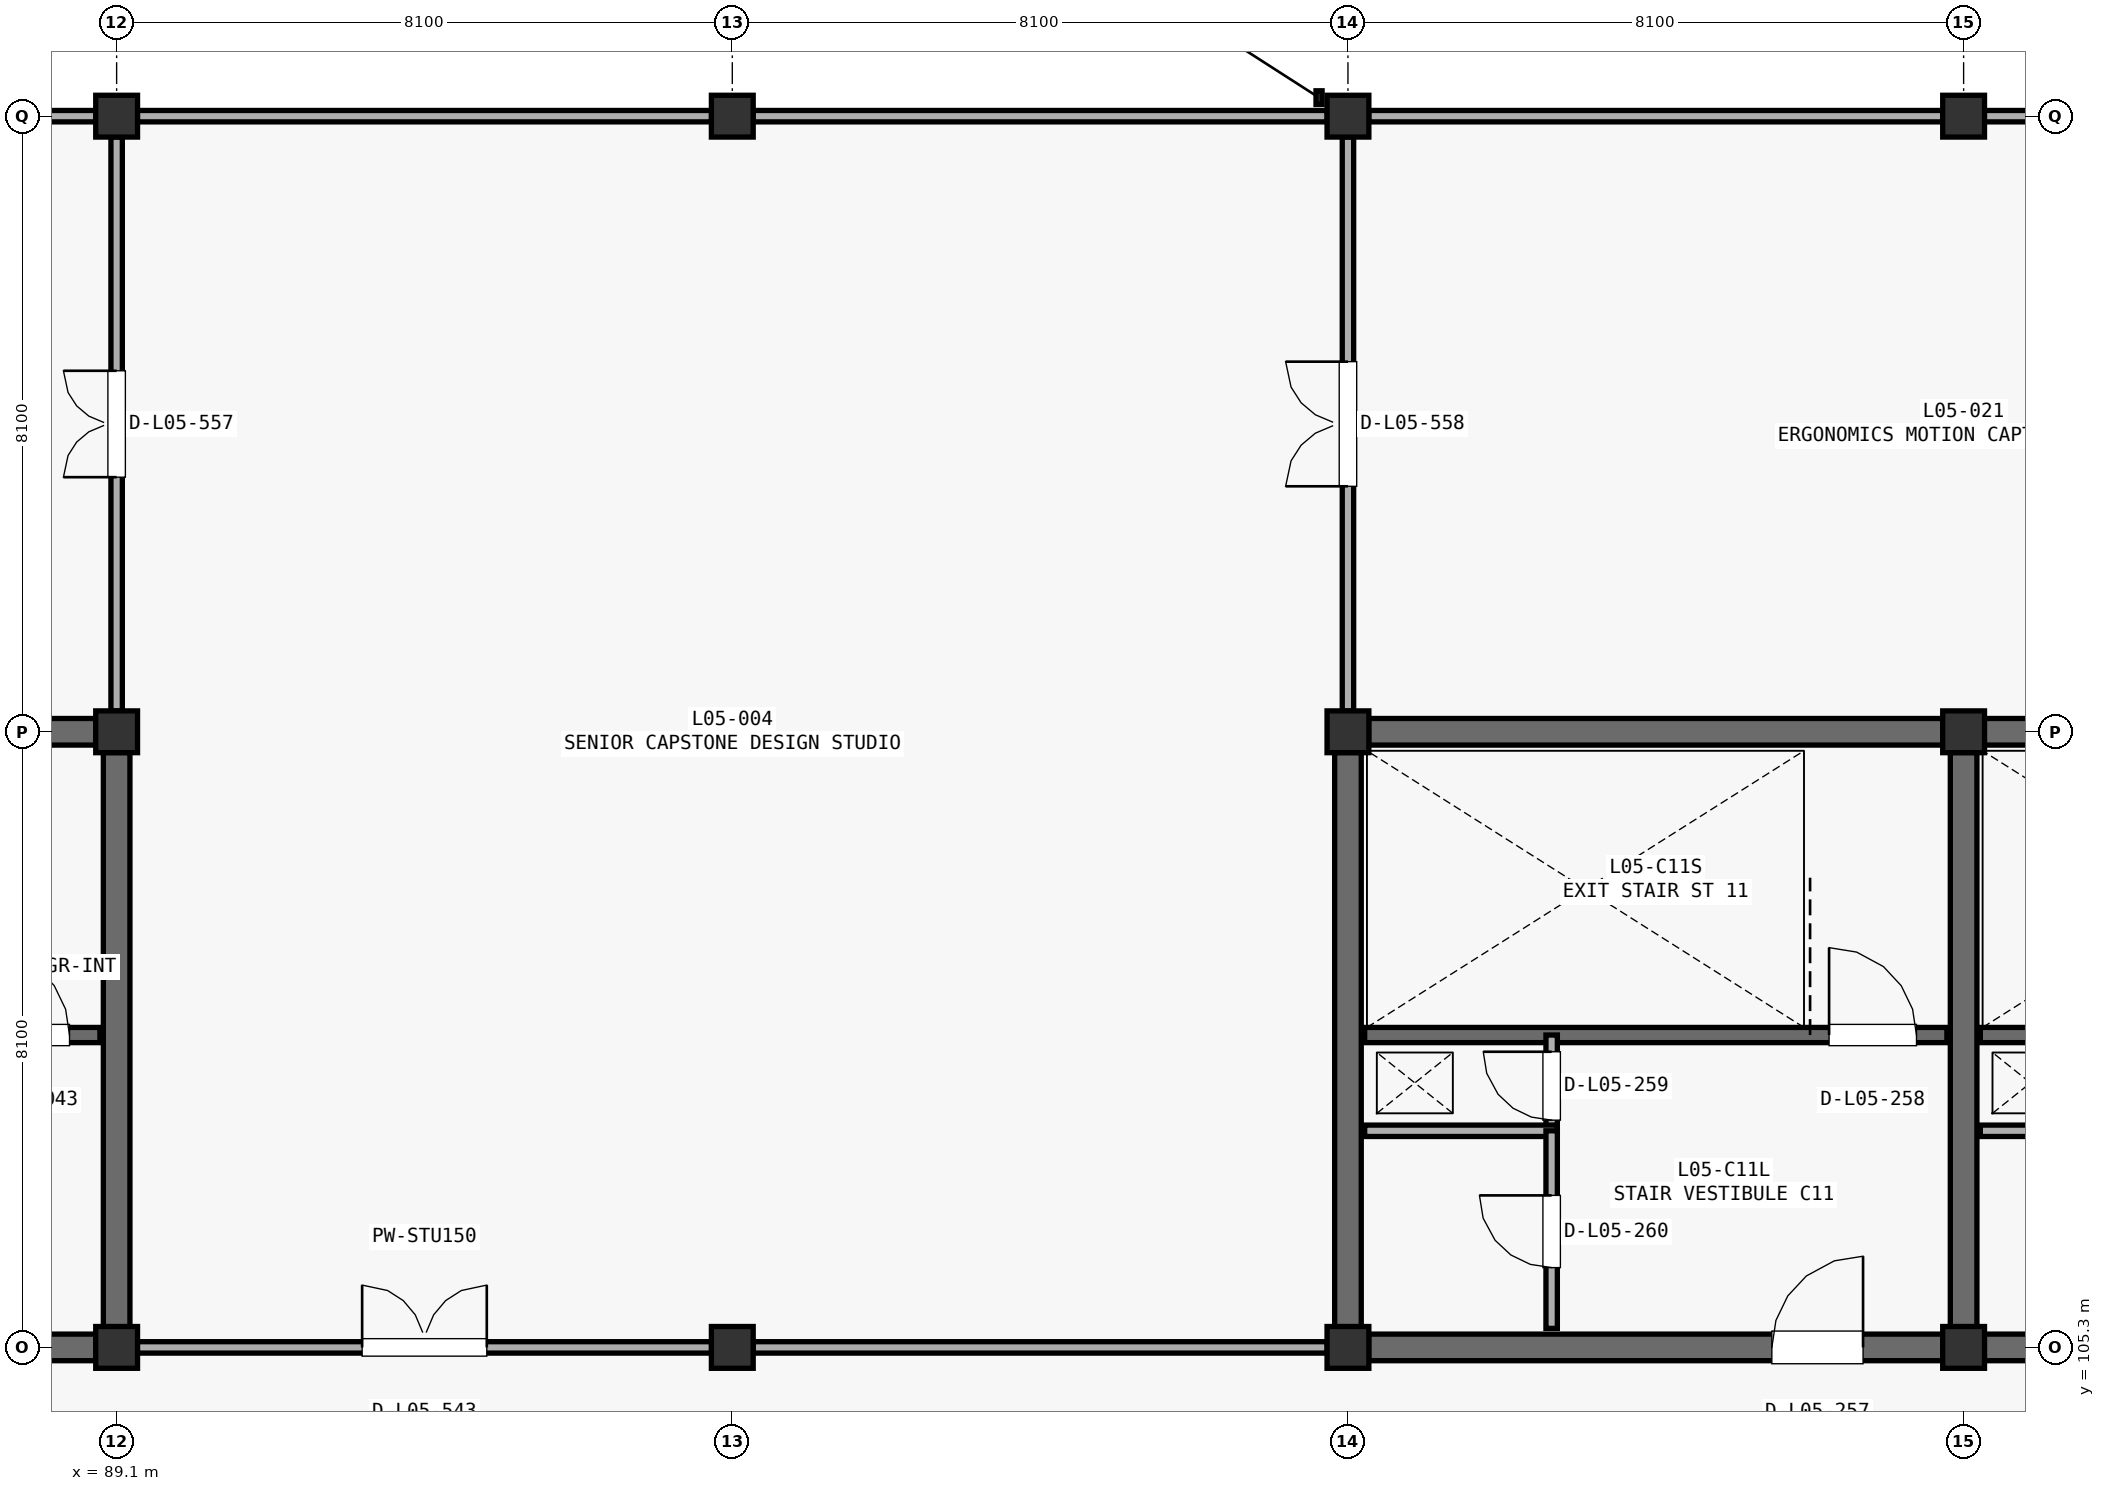
"""IFC4 building model, lengths in metres.
Left out: names, types, materials, properties, quantities, classifications, styles, units other than length and angle.
Written with IfcOpenShell. Run it as: python <this file> out.ifc"""

import sys

from ifc_helpers import new_model, si_unit, direction, frame, frame_2d, origin, origin_2d, place, context, subcontext, project, spatial, rectangle, extrude, element, fill, save


model = new_model("IFC4")
c1 = context("Model", 3, precision=1e-05, world=origin(), true_north=direction((0.0, 1.0)))
c2 = subcontext(c1, "Body", "Model", "MODEL_VIEW")
j1 = project(units=[si_unit("LENGTHUNIT", "METRE"), si_unit("PLANEANGLEUNIT", "RADIAN")], contexts=[c1])
p1 = place(None, origin())
s1 = spatial("IfcSite", under=j1, at=p1, CompositionType="ELEMENT")
p2 = place(p1, origin())
s2 = spatial("IfcBuilding", under=s1, at=p2, CompositionType="ELEMENT")
p3 = place(p2, frame((0.0, 0.0, 22.95)))
s3 = spatial("IfcBuildingStorey", under=s2, at=p3, CompositionType="ELEMENT", Elevation=22.95)
for number, where, z_axis, x_axis in (
    (1, (89.1, 105.3, 0.0), (0.0, 0.0, 1.0), (1.0, 0.0, 0.0)),
    (2, (89.1, 113.4, 0.0), (0.0, 0.0, 1.0), (1.0, 0.0, 0.0)),
    (3, (89.1, 121.5, 0.0), (0.0, 0.0, 1.0), (1.0, 0.0, 0.0)),
    (4, (97.2, 105.3, 0.0), (0.0, 0.0, 1.0), (1.0, 0.0, 0.0)),
    (5, (97.2, 113.4, 0.0), (0.0, 0.0, 1.0), (1.0, 0.0, 0.0)),
    (6, (97.2, 121.5, 0.0), (0.0, 0.0, 1.0), (1.0, 0.0, 0.0)),
    (7, (105.3, 105.3, 0.0), (0.0, 0.0, 1.0), (1.0, 0.0, 0.0)),
    (8, (105.3, 113.4, 0.0), (0.0, 0.0, 1.0), (1.0, 0.0, 0.0)),
    (9, (105.3, 121.5, 0.0), (0.0, 0.0, 1.0), (1.0, 0.0, 0.0)),
    (10, (113.4, 105.3, 0.0), (0.0, 0.0, 1.0), (1.0, 0.0, 0.0)),
    (11, (113.4, 113.4, 0.0), (0.0, 0.0, 1.0), (1.0, 0.0, 0.0)),
    (12, (113.4, 121.5, 0.0), (0.0, 0.0, 1.0), (1.0, 0.0, 0.0)),
):
    element("IfcColumn", number, at=place(p3, frame(where, z_axis=z_axis, x_axis=x_axis)), inside=s3, PredefinedType="COLUMN", context=c2, shape_type="SweptSolid", body=[
        extrude(rectangle(XDim=0.55, YDim=0.55, at=origin_2d()), origin(), (0.0, 0.0, 1.0), 4.42),
    ])
for number, where, z_axis, x_axis in (
    (13, (81.273, 113.4, 0.0), (0.0, 0.0, 1.0), (1.0, 0.0, 0.0)),
    (14, (89.1, 105.573, 0.0), (0.0, 0.0, 1.0), (0.0, 1.0, 0.0)),
):
    element("IfcWall", number, at=place(p3, frame(where, z_axis=z_axis, x_axis=x_axis)), inside=s3, PredefinedType="SHEAR", context=c2, shape_type="SweptSolid", body=[
        extrude(rectangle(XDim=7.554, YDim=0.35, at=frame_2d((3.777, 0.0))), origin(), (0.0, 0.0, 1.0), 4.162),
    ])
p4 = place(p3, frame((81.273, 105.3, 0.0), z_axis=(0.0, 0.0, 1.0), x_axis=(1.0, 0.0, 0.0)))
e15 = element("IfcWall", 15, at=p4, inside=s3, PredefinedType="SHEAR", context=c2, shape_type="SweptSolid", body=[
    extrude(rectangle(XDim=7.554, YDim=0.35, at=frame_2d((3.777, 0.0))), origin(), (0.0, 0.0, 1.0), 4.162),
])
p5 = place(p4, frame((5.304, 0.0, 0.0)))
e16 = element("IfcOpeningElement", 16, at=p5, cuts=e15, PredefinedType="OPENING", context=c2, shape_type="SweptSolid", body=[
    extrude(rectangle(XDim=1.2, YDim=2.2, at=frame_2d((0.6, 1.1))), frame((0.0, 0.185, 0.0), z_axis=(0.0, -1.0, 0.0), x_axis=(1.0, 0.0, 0.0)), (0.0, 0.0, 1.0), 0.37),
])
p6 = place(p3, frame((81.22, 109.41, 0.0), z_axis=(0.0, 0.0, 1.0), x_axis=(1.0, 0.0, 0.0)))
e17 = element("IfcWall", 17, at=p6, inside=s3, PredefinedType="SHEAR", context=c2, shape_type="SweptSolid", body=[
    extrude(rectangle(XDim=7.66, YDim=0.2, at=frame_2d((3.83, 0.0))), origin(), (0.0, 0.0, 1.0), 4.162),
])
p7 = place(p6, frame((6.11, 0.0, 0.0)))
e18 = element("IfcOpeningElement", 18, at=p7, cuts=e17, PredefinedType="OPENING", context=c2, shape_type="SweptSolid", body=[
    extrude(rectangle(XDim=1.15, YDim=2.2, at=frame_2d((0.575, 1.1))), frame((0.0, 0.11, 0.0), z_axis=(0.0, -1.0, 0.0), x_axis=(1.0, 0.0, 0.0)), (0.0, 0.0, 1.0), 0.22),
])
for number, where, z_axis, x_axis in (
    (19, (113.673, 113.4, 0.0), (0.0, 0.0, 1.0), (1.0, 0.0, 0.0)),
    (20, (113.4, 105.573, 0.0), (0.0, 0.0, 1.0), (0.0, 1.0, 0.0)),
):
    element("IfcWall", number, at=place(p3, frame(where, z_axis=z_axis, x_axis=x_axis)), inside=s3, PredefinedType="SHEAR", context=c2, shape_type="SweptSolid", body=[
        extrude(rectangle(XDim=7.554, YDim=0.35, at=frame_2d((3.777, 0.0))), origin(), (0.0, 0.0, 1.0), 4.162),
    ])
p8 = place(p3, frame((113.673, 105.3, 0.0), z_axis=(0.0, 0.0, 1.0), x_axis=(1.0, 0.0, 0.0)))
e21 = element("IfcWall", 21, at=p8, inside=s3, PredefinedType="SHEAR", context=c2, shape_type="SweptSolid", body=[
    extrude(rectangle(XDim=7.554, YDim=0.35, at=frame_2d((3.777, 0.0))), origin(), (0.0, 0.0, 1.0), 4.162),
])
p9 = place(p8, frame((5.304, 0.0, 0.0)))
e22 = element("IfcOpeningElement", 22, at=p9, cuts=e21, PredefinedType="OPENING", context=c2, shape_type="SweptSolid", body=[
    extrude(rectangle(XDim=1.2, YDim=2.2, at=frame_2d((0.6, 1.1))), frame((0.0, 0.185, 0.0), z_axis=(0.0, -1.0, 0.0), x_axis=(1.0, 0.0, 0.0)), (0.0, 0.0, 1.0), 0.37),
])
p10 = place(p3, frame((113.62, 109.41, 0.0), z_axis=(0.0, 0.0, 1.0), x_axis=(1.0, 0.0, 0.0)))
e23 = element("IfcWall", 23, at=p10, inside=s3, PredefinedType="SHEAR", context=c2, shape_type="SweptSolid", body=[
    extrude(rectangle(XDim=7.66, YDim=0.2, at=frame_2d((3.83, 0.0))), origin(), (0.0, 0.0, 1.0), 4.162),
])
p11 = place(p10, frame((6.11, 0.0, 0.0)))
e24 = element("IfcOpeningElement", 24, at=p11, cuts=e23, PredefinedType="OPENING", context=c2, shape_type="SweptSolid", body=[
    extrude(rectangle(XDim=1.15, YDim=2.2, at=frame_2d((0.575, 1.1))), frame((0.0, 0.11, 0.0), z_axis=(0.0, -1.0, 0.0), x_axis=(1.0, 0.0, 0.0)), (0.0, 0.0, 1.0), 0.22),
])
p12 = place(p3, frame((113.62, 108.15, 0.0), z_axis=(0.0, 0.0, 1.0), x_axis=(1.0, 0.0, 0.0)))
e25 = element("IfcWall", 25, at=p12, inside=s3, PredefinedType="PARTITIONING", context=c2, shape_type="SweptSolid", body=[
    extrude(rectangle(XDim=2.53, YDim=0.15, at=frame_2d((1.265, 0.0))), origin(), (0.0, 0.0, 1.0), 4.162),
])
for number, where, z_axis, x_axis in (
    (26, (105.573, 113.4, 0.0), (0.0, 0.0, 1.0), (1.0, 0.0, 0.0)),
    (27, (105.3, 105.573, 0.0), (0.0, 0.0, 1.0), (0.0, 1.0, 0.0)),
):
    element("IfcWall", number, at=place(p3, frame(where, z_axis=z_axis, x_axis=x_axis)), inside=s3, PredefinedType="SHEAR", context=c2, shape_type="SweptSolid", body=[
        extrude(rectangle(XDim=7.554, YDim=0.35, at=frame_2d((3.777, 0.0))), origin(), (0.0, 0.0, 1.0), 4.162),
    ])
p13 = place(p3, frame((105.573, 105.3, 0.0), z_axis=(0.0, 0.0, 1.0), x_axis=(1.0, 0.0, 0.0)))
e28 = element("IfcWall", 28, at=p13, inside=s3, PredefinedType="SHEAR", context=c2, shape_type="SweptSolid", body=[
    extrude(rectangle(XDim=7.554, YDim=0.35, at=frame_2d((3.777, 0.0))), origin(), (0.0, 0.0, 1.0), 4.162),
])
p14 = place(p13, frame((5.304, 0.0, 0.0)))
e29 = element("IfcOpeningElement", 29, at=p14, cuts=e28, PredefinedType="OPENING", context=c2, shape_type="SweptSolid", body=[
    extrude(rectangle(XDim=1.2, YDim=2.2, at=frame_2d((0.6, 1.1))), frame((0.0, 0.185, 0.0), z_axis=(0.0, -1.0, 0.0), x_axis=(1.0, 0.0, 0.0)), (0.0, 0.0, 1.0), 0.37),
])
p15 = place(p3, frame((105.52, 109.41, 0.0), z_axis=(0.0, 0.0, 1.0), x_axis=(1.0, 0.0, 0.0)))
e30 = element("IfcWall", 30, at=p15, inside=s3, PredefinedType="SHEAR", context=c2, shape_type="SweptSolid", body=[
    extrude(rectangle(XDim=7.66, YDim=0.2, at=frame_2d((3.83, 0.0))), origin(), (0.0, 0.0, 1.0), 4.162),
])
p16 = place(p15, frame((6.11, 0.0, 0.0)))
e31 = element("IfcOpeningElement", 31, at=p16, cuts=e30, PredefinedType="OPENING", context=c2, shape_type="SweptSolid", body=[
    extrude(rectangle(XDim=1.15, YDim=2.2, at=frame_2d((0.575, 1.1))), frame((0.0, 0.11, 0.0), z_axis=(0.0, -1.0, 0.0), x_axis=(1.0, 0.0, 0.0)), (0.0, 0.0, 1.0), 0.22),
])
p17 = place(p3, frame((107.98, 108.15, 0.0), z_axis=(0.0, 0.0, 1.0), x_axis=(0.0, 1.0, 0.0)))
e32 = element("IfcWall", 32, at=p17, inside=s3, PredefinedType="PARTITIONING", context=c2, shape_type="SweptSolid", body=[
    extrude(rectangle(XDim=1.26, YDim=0.15, at=frame_2d((0.63, 0.0))), origin(), (0.0, 0.0, 1.0), 4.162),
])
p18 = place(p17, frame((0.14, 0.0, 0.0)))
e33 = element("IfcOpeningElement", 33, at=p18, cuts=e32, PredefinedType="OPENING", context=c2, shape_type="SweptSolid", body=[
    extrude(rectangle(XDim=0.9, YDim=2.15, at=frame_2d((0.45, 1.075))), frame((0.0, 0.085, 0.0), z_axis=(0.0, -1.0, 0.0), x_axis=(1.0, 0.0, 0.0)), (0.0, 0.0, 1.0), 0.17),
])
p19 = place(p3, frame((105.52, 108.15, 0.0), z_axis=(0.0, 0.0, 1.0), x_axis=(1.0, 0.0, 0.0)))
e34 = element("IfcWall", 34, at=p19, inside=s3, PredefinedType="PARTITIONING", context=c2, shape_type="SweptSolid", body=[
    extrude(rectangle(XDim=2.53, YDim=0.15, at=frame_2d((1.265, 0.0))), origin(), (0.0, 0.0, 1.0), 4.162),
])
p20 = place(p3, frame((107.98, 105.55, 0.0), z_axis=(0.0, 0.0, 1.0), x_axis=(0.0, 1.0, 0.0)))
e35 = element("IfcWall", 35, at=p20, inside=s3, PredefinedType="PARTITIONING", context=c2, shape_type="SweptSolid", body=[
    extrude(rectangle(XDim=2.6, YDim=0.15, at=frame_2d((1.3, 0.0))), origin(), (0.0, 0.0, 1.0), 4.162),
])
p21 = place(p20, frame((0.8, 0.0, 0.0)))
e36 = element("IfcOpeningElement", 36, at=p21, cuts=e35, PredefinedType="OPENING", context=c2, shape_type="SweptSolid", body=[
    extrude(rectangle(XDim=0.95, YDim=2.15, at=frame_2d((0.475, 1.075))), frame((0.0, 0.085, 0.0), z_axis=(0.0, -1.0, 0.0), x_axis=(1.0, 0.0, 0.0)), (0.0, 0.0, 1.0), 0.17),
])
p22 = place(p3, frame((89.373, 105.3, 0.0), z_axis=(0.0, 0.0, 1.0), x_axis=(1.0, 0.0, 0.0)))
e37 = element("IfcWall", 37, at=p22, inside=s3, PredefinedType="PARTITIONING", context=c2, shape_type="SweptSolid", body=[
    extrude(rectangle(XDim=7.554, YDim=0.15, at=frame_2d((3.777, 0.0))), origin(), (0.0, 0.0, 1.0), 3.412),
])
p23 = place(p22, frame((2.957, 0.0, 0.0)))
e38 = element("IfcOpeningElement", 38, at=p23, cuts=e37, PredefinedType="OPENING", context=c2, shape_type="SweptSolid", body=[
    extrude(rectangle(XDim=1.64, YDim=2.25, at=frame_2d((0.82, 1.125))), frame((0.0, 0.085, 0.0), z_axis=(0.0, -1.0, 0.0), x_axis=(1.0, 0.0, 0.0)), (0.0, 0.0, 1.0), 0.17),
])
p24 = place(p3, frame((97.473, 105.3, 0.0), z_axis=(0.0, 0.0, 1.0), x_axis=(1.0, 0.0, 0.0)))
e39 = element("IfcWall", 39, at=p24, inside=s3, PredefinedType="PARTITIONING", context=c2, shape_type="SweptSolid", body=[
    extrude(rectangle(XDim=7.554, YDim=0.15, at=frame_2d((3.777, 0.0))), origin(), (0.0, 0.0, 1.0), 3.512),
])
p25 = place(p3, frame((105.3, 113.673, 0.0), z_axis=(0.0, 0.0, 1.0), x_axis=(0.0, 1.0, 0.0)))
e40 = element("IfcWall", 40, at=p25, inside=s3, PredefinedType="PARTITIONING", context=c2, shape_type="SweptSolid", body=[
    extrude(rectangle(XDim=7.554, YDim=0.15, at=frame_2d((3.777, 0.0))), origin(), (0.0, 0.0, 1.0), 3.512),
])
p26 = place(p25, frame((2.957, 0.0, 0.0)))
e41 = element("IfcOpeningElement", 41, at=p26, cuts=e40, PredefinedType="OPENING", context=c2, shape_type="SweptSolid", body=[
    extrude(rectangle(XDim=1.64, YDim=2.25, at=frame_2d((0.82, 1.125))), frame((0.0, 0.085, 0.0), z_axis=(0.0, -1.0, 0.0), x_axis=(1.0, 0.0, 0.0)), (0.0, 0.0, 1.0), 0.17),
])
p27 = place(p3, frame((89.1, 113.673, 0.0), z_axis=(0.0, 0.0, 1.0), x_axis=(0.0, 1.0, 0.0)))
e42 = element("IfcWall", 42, at=p27, inside=s3, PredefinedType="PARTITIONING", context=c2, shape_type="SweptSolid", body=[
    extrude(rectangle(XDim=7.554, YDim=0.15, at=frame_2d((3.777, 0.0))), origin(), (0.0, 0.0, 1.0), 3.562),
])
p28 = place(p27, frame((3.077, 0.0, 0.0)))
e43 = element("IfcOpeningElement", 43, at=p28, cuts=e42, PredefinedType="OPENING", context=c2, shape_type="SweptSolid", body=[
    extrude(rectangle(XDim=1.4, YDim=2.2, at=frame_2d((0.7, 1.1))), frame((0.0, 0.085, 0.0), z_axis=(0.0, -1.0, 0.0), x_axis=(1.0, 0.0, 0.0)), (0.0, 0.0, 1.0), 0.17),
])
p29 = place(p3, frame((89.373, 121.5, 0.0), z_axis=(0.0, 0.0, 1.0), x_axis=(1.0, 0.0, 0.0)))
e44 = element("IfcWall", 44, at=p29, inside=s3, PredefinedType="PARTITIONING", context=c2, shape_type="SweptSolid", body=[
    extrude(rectangle(XDim=7.554, YDim=0.15, at=frame_2d((3.777, 0.0))), origin(), (0.0, 0.0, 1.0), 3.562),
])
p30 = place(p3, frame((97.473, 121.5, 0.0), z_axis=(0.0, 0.0, 1.0), x_axis=(1.0, 0.0, 0.0)))
e45 = element("IfcWall", 45, at=p30, inside=s3, PredefinedType="PARTITIONING", context=c2, shape_type="SweptSolid", body=[
    extrude(rectangle(XDim=7.554, YDim=0.15, at=frame_2d((3.777, 0.0))), origin(), (0.0, 0.0, 1.0), 3.512),
])
p31 = place(p3, frame((81.273, 121.5, 0.0), z_axis=(0.0, 0.0, 1.0), x_axis=(1.0, 0.0, 0.0)))
e46 = element("IfcWall", 46, at=p31, inside=s3, PredefinedType="PARTITIONING", context=c2, shape_type="SweptSolid", body=[
    extrude(rectangle(XDim=7.554, YDim=0.15, at=frame_2d((3.777, 0.0))), origin(), (0.0, 0.0, 1.0), 3.512),
])
p32 = place(p3, frame((105.573, 121.5, 0.0), z_axis=(0.0, 0.0, 1.0), x_axis=(1.0, 0.0, 0.0)))
e47 = element("IfcWall", 47, at=p32, inside=s3, PredefinedType="PARTITIONING", context=c2, shape_type="SweptSolid", body=[
    extrude(rectangle(XDim=7.554, YDim=0.15, at=frame_2d((3.777, 0.0))), origin(), (0.0, 0.0, 1.0), 3.212),
])
p33 = place(p3, frame((113.673, 121.5, 0.0), z_axis=(0.0, 0.0, 1.0), x_axis=(1.0, 0.0, 0.0)))
e48 = element("IfcWall", 48, at=p33, inside=s3, PredefinedType="PARTITIONING", context=c2, shape_type="SweptSolid", body=[
    extrude(rectangle(XDim=7.554, YDim=0.15, at=frame_2d((3.777, 0.0))), origin(), (0.0, 0.0, 1.0), 3.412),
])
p34 = place(p7, origin())
e49 = element("IfcDoor", 49, at=p34, inside=s3, OperationType="SINGLE_SWING_LEFT", PredefinedType="DOOR", context=c2, shape_type="SweptSolid", body=[
    extrude(rectangle(XDim=1.15, YDim=2.2, at=frame_2d((0.575, 1.1))), frame((0.0, 0.025, 0.0), z_axis=(0.0, -1.0, 0.0), x_axis=(1.0, 0.0, 0.0)), (0.0, 0.0, 1.0), 0.05),
])
fill(e18, e49)
p35 = place(p14, origin())
e50 = element("IfcDoor", 50, at=p35, inside=s3, OperationType="SINGLE_SWING_RIGHT", PredefinedType="DOOR", context=c2, shape_type="SweptSolid", body=[
    extrude(rectangle(XDim=1.2, YDim=2.2, at=frame_2d((0.6, 1.1))), frame((0.0, 0.025, 0.0), z_axis=(0.0, -1.0, 0.0), x_axis=(1.0, 0.0, 0.0)), (0.0, 0.0, 1.0), 0.05),
])
fill(e29, e50)
p36 = place(p16, origin())
e51 = element("IfcDoor", 51, at=p36, inside=s3, OperationType="SINGLE_SWING_LEFT", PredefinedType="DOOR", context=c2, shape_type="SweptSolid", body=[
    extrude(rectangle(XDim=1.15, YDim=2.2, at=frame_2d((0.575, 1.1))), frame((0.0, 0.025, 0.0), z_axis=(0.0, -1.0, 0.0), x_axis=(1.0, 0.0, 0.0)), (0.0, 0.0, 1.0), 0.05),
])
fill(e31, e51)
p37 = place(p18, origin())
e52 = element("IfcDoor", 52, at=p37, inside=s3, OperationType="SINGLE_SWING_RIGHT", PredefinedType="DOOR", context=c2, shape_type="SweptSolid", body=[
    extrude(rectangle(XDim=0.9, YDim=2.15, at=frame_2d((0.45, 1.075))), frame((0.0, 0.025, 0.0), z_axis=(0.0, -1.0, 0.0), x_axis=(1.0, 0.0, 0.0)), (0.0, 0.0, 1.0), 0.05),
])
fill(e33, e52)
p38 = place(p21, origin())
e53 = element("IfcDoor", 53, at=p38, inside=s3, OperationType="SINGLE_SWING_RIGHT", PredefinedType="DOOR", context=c2, shape_type="SweptSolid", body=[
    extrude(rectangle(XDim=0.95, YDim=2.15, at=frame_2d((0.475, 1.075))), frame((0.0, 0.025, 0.0), z_axis=(0.0, -1.0, 0.0), x_axis=(1.0, 0.0, 0.0)), (0.0, 0.0, 1.0), 0.05),
])
fill(e36, e53)
p39 = place(p23, origin())
e54 = element("IfcDoor", 54, at=p39, inside=s3, OperationType="DOUBLE_SWING_LEFT", PredefinedType="DOOR", context=c2, shape_type="SweptSolid", body=[
    extrude(rectangle(XDim=1.64, YDim=2.25, at=frame_2d((0.82, 1.125))), frame((0.0, 0.025, 0.0), z_axis=(0.0, -1.0, 0.0), x_axis=(1.0, 0.0, 0.0)), (0.0, 0.0, 1.0), 0.05),
])
fill(e38, e54)
p40 = place(p28, origin())
e55 = element("IfcDoor", 55, at=p40, inside=s3, OperationType="DOUBLE_SWING_LEFT", PredefinedType="DOOR", context=c2, shape_type="SweptSolid", body=[
    extrude(rectangle(XDim=1.4, YDim=2.2, at=frame_2d((0.7, 1.1))), frame((0.0, 0.025, 0.0), z_axis=(0.0, -1.0, 0.0), x_axis=(1.0, 0.0, 0.0)), (0.0, 0.0, 1.0), 0.05),
])
fill(e43, e55)
p41 = place(p26, origin())
e56 = element("IfcDoor", 56, at=p41, inside=s3, OperationType="DOUBLE_SWING_LEFT", PredefinedType="DOOR", context=c2, shape_type="SweptSolid", body=[
    extrude(rectangle(XDim=1.64, YDim=2.25, at=frame_2d((0.82, 1.125))), frame((0.0, 0.025, 0.0), z_axis=(0.0, -1.0, 0.0), x_axis=(1.0, 0.0, 0.0)), (0.0, 0.0, 1.0), 0.05),
])
fill(e41, e56)
save(model, sys.argv[1])
